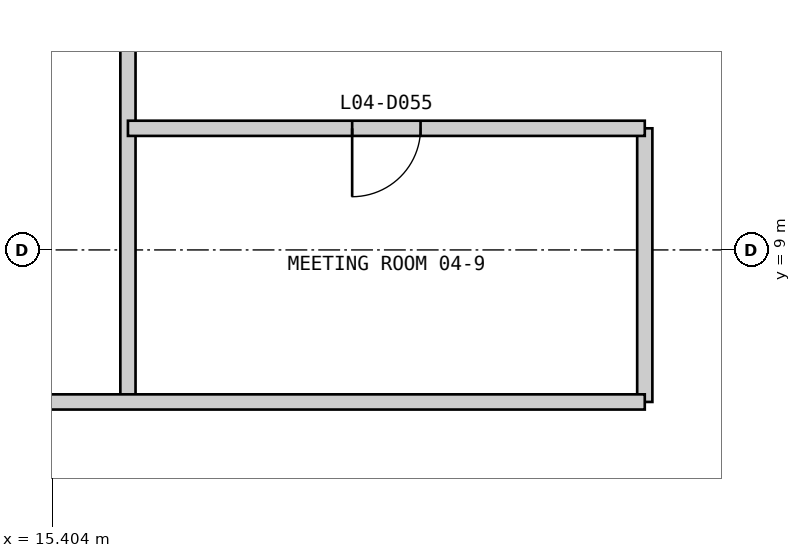
"""IFC4 building model, lengths in metres.
Left out: names, types, materials, properties, quantities, classifications, styles, units other than length and angle.
Written with IfcOpenShell. Run it as: python <this file> out.ifc"""

import sys

from ifc_helpers import new_model, si_unit, direction, frame, frame_2d, origin, place, context, subcontext, project, spatial, rectangle, extrude, element, fill, save


model = new_model("IFC4")
c1 = context("Model", 3, precision=1e-05, world=origin(), true_north=direction((0.0, 1.0)))
c2 = subcontext(c1, "Body", "Model", "MODEL_VIEW")
j1 = project(units=[si_unit("LENGTHUNIT", "METRE"), si_unit("PLANEANGLEUNIT", "RADIAN")], contexts=[c1])
p1 = place(None, origin())
s1 = spatial("IfcSite", under=j1, at=p1, CompositionType="ELEMENT")
p2 = place(p1, origin())
s2 = spatial("IfcBuilding", under=s1, at=p2, CompositionType="ELEMENT")
p3 = place(p2, frame((0.0, 0.0, 21.4)))
s3 = spatial("IfcBuildingStorey", under=s2, at=p3, CompositionType="ELEMENT", Elevation=21.4)
p4 = place(p3, frame((16.4, 7.0, 0.0), z_axis=(0.0, 0.0, 1.0), x_axis=(0.0, 1.0, 0.0)))
e1 = element("IfcWall", 1, at=p4, inside=s3, PredefinedType="PARTITIONING", context=c2, shape_type="SweptSolid", body=[
    extrude(rectangle(XDim=6.0, YDim=0.2, at=frame_2d((3.0, 0.0))), origin(), (0.0, 0.0, 1.0), 4.5),
])
p5 = place(p3, frame((23.2, 7.0, 0.0), z_axis=(0.0, 0.0, 1.0), x_axis=(0.0, 1.0, 0.0)))
e2 = element("IfcWall", 2, at=p5, inside=s3, PredefinedType="PARTITIONING", context=c2, shape_type="SweptSolid", body=[
    extrude(rectangle(XDim=3.6, YDim=0.2, at=frame_2d((1.8, 0.0))), origin(), (0.0, 0.0, 1.0), 4.5),
])
p6 = place(p3, frame((-0.6, 7.0, 0.0), z_axis=(0.0, 0.0, 1.0), x_axis=(1.0, 0.0, 0.0)))
e3 = element("IfcWall", 3, at=p6, inside=s3, PredefinedType="PARTITIONING", context=c2, shape_type="SweptSolid", body=[
    extrude(rectangle(XDim=23.8, YDim=0.2, at=frame_2d((11.9, 0.0))), origin(), (0.0, 0.0, 1.0), 4.5),
])
p7 = place(p6, frame((14.15, 0.0, 0.0)))
e4 = element("IfcOpeningElement", 4, at=p7, cuts=e3, PredefinedType="OPENING", context=c2, shape_type="SweptSolid", body=[
    extrude(rectangle(XDim=0.9, YDim=2.2, at=frame_2d((0.45, 1.1))), frame((0.0, 0.11, 0.0), z_axis=(0.0, -1.0, 0.0), x_axis=(1.0, 0.0, 0.0)), (0.0, 0.0, 1.0), 0.22),
])
p8 = place(p3, frame((16.4, 10.6, 0.0), z_axis=(0.0, 0.0, 1.0), x_axis=(1.0, 0.0, 0.0)))
e5 = element("IfcWall", 5, at=p8, inside=s3, PredefinedType="PARTITIONING", context=c2, shape_type="SweptSolid", body=[
    extrude(rectangle(XDim=6.8, YDim=0.2, at=frame_2d((3.4, 0.0))), origin(), (0.0, 0.0, 1.0), 4.5),
])
p9 = place(p8, frame((2.95, 0.0, 0.0)))
e6 = element("IfcOpeningElement", 6, at=p9, cuts=e5, PredefinedType="OPENING", context=c2, shape_type="SweptSolid", body=[
    extrude(rectangle(XDim=0.9, YDim=2.2, at=frame_2d((0.45, 1.1))), frame((0.0, 0.11, 0.0), z_axis=(0.0, -1.0, 0.0), x_axis=(1.0, 0.0, 0.0)), (0.0, 0.0, 1.0), 0.22),
])
p10 = place(p9, frame((0.9, 0.0, 0.0), z_axis=(0.0, 0.0, 1.0), x_axis=(-1.0, 0.0, 0.0)))
e7 = element("IfcDoor", 7, at=p10, inside=s3, OperationType="SINGLE_SWING_RIGHT", PredefinedType="DOOR", context=c2, shape_type="SweptSolid", body=[
    extrude(rectangle(XDim=0.9, YDim=2.2, at=frame_2d((0.45, 1.1))), frame((0.0, 0.025, 0.0), z_axis=(0.0, -1.0, 0.0), x_axis=(1.0, 0.0, 0.0)), (0.0, 0.0, 1.0), 0.05),
])
fill(e6, e7)
save(model, sys.argv[1])
